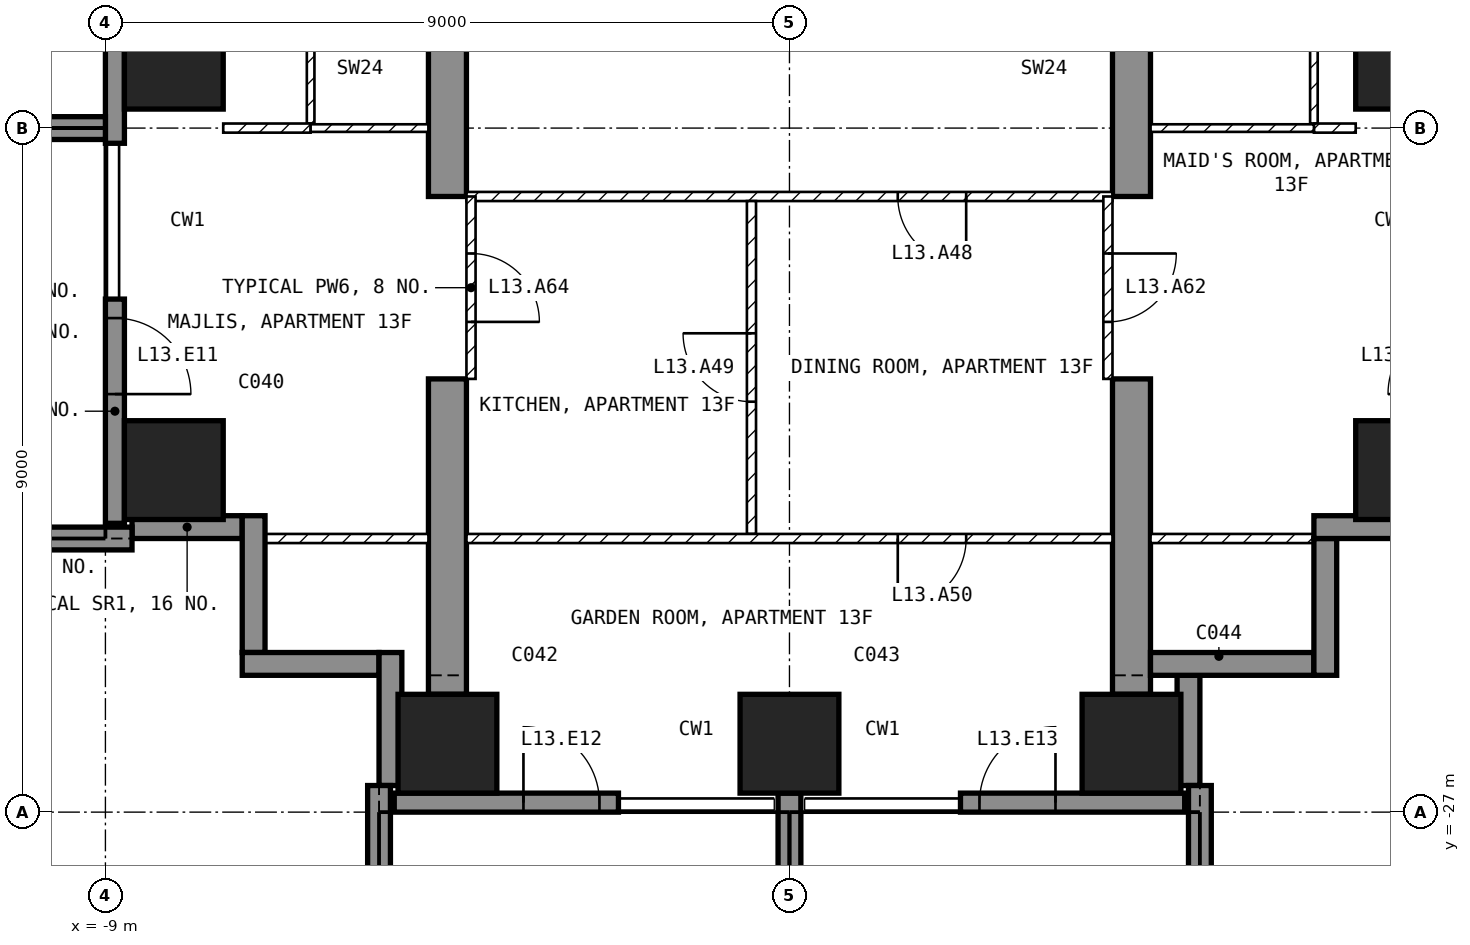
"""IFC4 building model, lengths in metres.
Left out: names, types, materials, properties, quantities, classifications, styles, units other than length and angle.
Written with IfcOpenShell. Run it as: python <this file> out.ifc"""

import sys

from ifc_helpers import new_model, si_unit, direction, frame, frame_2d, origin, origin_2d, place, context, subcontext, project, spatial, polyline, rectangle, outline, extrude, element, fill, save


model = new_model("IFC4")
c1 = context("Model", 3, precision=1e-05, world=origin(), true_north=direction((0.0, 1.0)))
c2 = subcontext(c1, "Body", "Model", "MODEL_VIEW")
j1 = project(units=[si_unit("LENGTHUNIT", "METRE"), si_unit("PLANEANGLEUNIT", "RADIAN")], contexts=[c1])
p1 = place(None, origin())
s1 = spatial("IfcSite", under=j1, at=p1, CompositionType="ELEMENT")
p2 = place(p1, origin())
s2 = spatial("IfcBuilding", under=s1, at=p2, CompositionType="ELEMENT")
p3 = place(p2, frame((0.0, 0.0, 64.5)))
s3 = spatial("IfcBuildingStorey", under=s2, at=p3, CompositionType="ELEMENT", Elevation=64.5)
for number, where, z_axis, x_axis in (
    (1, (-8.1, -22.5, -0.25), (0.0, 0.0, 1.0), (1.0, 0.0, 0.0)),
    (2, (-8.1, -17.1, -0.25), (0.0, 0.0, 1.0), (1.0, 0.0, 0.0)),
    (3, (-4.5, -26.1, -0.25), (0.0, 0.0, 1.0), (1.0, 0.0, 0.0)),
    (4, (0.0, -26.1, -0.25), (0.0, 0.0, 1.0), (1.0, 0.0, 0.0)),
    (5, (4.5, -26.1, -0.25), (0.0, 0.0, 1.0), (1.0, 0.0, 0.0)),
    (6, (8.1, -22.5, -0.25), (0.0, 0.0, 1.0), (1.0, 0.0, 0.0)),
    (7, (8.1, -17.1, -0.25), (0.0, 0.0, 1.0), (1.0, 0.0, 0.0)),
):
    element("IfcColumn", number, at=place(p3, frame(where, z_axis=z_axis, x_axis=x_axis)), inside=s3, PredefinedType="COLUMN", context=c2, shape_type="SweptSolid", body=[
        extrude(rectangle(XDim=1.3, YDim=1.3, at=origin_2d()), origin(), (0.0, 0.0, 1.0), 3.5),
    ])
for number, where, z_axis, x_axis in (
    (8, (-4.75, -25.45, -0.25), (1.0, 0.0, 0.0), (0.0, 1.0, 0.0)),
    (9, (4.25, -25.45, -0.25), (1.0, 0.0, 0.0), (0.0, 1.0, 0.0)),
):
    element("IfcWall", number, at=place(p3, frame(where, z_axis=z_axis, x_axis=x_axis)), inside=s3, PredefinedType="SHEAR", context=c2, shape_type="SweptSolid", body=[
        extrude(outline(polyline([(0.0, 0.0), (4.15, 0.0), (4.15, 2.65), (6.55, 2.65), (6.55, 0.0), (11.95, 0.0), (11.95, 2.65), (14.35, 2.65), (14.35, 0.0), (16.45, 0.0), (16.45, 3.5), (0.0, 3.5), (0.0, 0.0)])), origin(), (0.0, 0.0, 1.0), 0.5),
    ])
p4 = place(p3, frame((-8.875, -14.65, 0.0), z_axis=(0.0, 0.0, 1.0), x_axis=(0.0, -1.0, 0.0)))
e10 = element("IfcWall", 10, at=p4, inside=s3, PredefinedType="SOLIDWALL", context=c2, shape_type="SweptSolid", body=[
    extrude(rectangle(XDim=3.55, YDim=0.25, at=frame_2d((1.775, 0.0))), origin(), (0.0, 0.0, 1.0), 3.25),
])
p5 = place(p4, frame((0.25, 0.0, 0.0)))
e11 = element("IfcOpeningElement", 11, at=p5, cuts=e10, PredefinedType="OPENING", context=c2, shape_type="SweptSolid", body=[
    extrude(rectangle(XDim=1.2, YDim=2.4, at=frame_2d((0.6, 1.2))), frame((0.0, 0.135, 0.0), z_axis=(0.0, -1.0, 0.0), x_axis=(1.0, 0.0, 0.0)), (0.0, 0.0, 1.0), 0.27),
])
p6 = place(p3, frame((-8.875, -20.25, 0.0), z_axis=(0.0, 0.0, 1.0), x_axis=(0.0, -1.0, 0.0)))
e12 = element("IfcWall", 12, at=p6, inside=s3, PredefinedType="SOLIDWALL", context=c2, shape_type="SweptSolid", body=[
    extrude(rectangle(XDim=2.95, YDim=0.25, at=frame_2d((1.475, 0.0))), origin(), (0.0, 0.0, 1.0), 3.25),
])
p7 = place(p6, frame((0.25, 0.0, 0.0)))
e13 = element("IfcOpeningElement", 13, at=p7, cuts=e12, PredefinedType="OPENING", context=c2, shape_type="SweptSolid", body=[
    extrude(rectangle(XDim=1.0, YDim=2.4, at=frame_2d((0.5, 1.2))), frame((0.0, 0.135, 0.0), z_axis=(0.0, -1.0, 0.0), x_axis=(1.0, 0.0, 0.0)), (0.0, 0.0, 1.0), 0.27),
])
p8 = place(p3, frame((-5.2, -26.875, 0.0), z_axis=(0.0, 0.0, 1.0), x_axis=(1.0, 0.0, 0.0)))
e14 = element("IfcWall", 14, at=p8, inside=s3, PredefinedType="SOLIDWALL", context=c2, shape_type="SweptSolid", body=[
    extrude(rectangle(XDim=2.95, YDim=0.25, at=frame_2d((1.475, 0.0))), origin(), (0.0, 0.0, 1.0), 3.25),
])
p9 = place(p8, frame((1.7, 0.0, 0.0)))
e15 = element("IfcOpeningElement", 15, at=p9, cuts=e14, PredefinedType="OPENING", context=c2, shape_type="SweptSolid", body=[
    extrude(rectangle(XDim=1.0, YDim=2.4, at=frame_2d((0.5, 1.2))), frame((0.0, 0.135, 0.0), z_axis=(0.0, -1.0, 0.0), x_axis=(1.0, 0.0, 0.0)), (0.0, 0.0, 1.0), 0.27),
])
p10 = place(p3, frame((2.25, -26.875, 0.0), z_axis=(0.0, 0.0, 1.0), x_axis=(1.0, 0.0, 0.0)))
e16 = element("IfcWall", 16, at=p10, inside=s3, PredefinedType="SOLIDWALL", context=c2, shape_type="SweptSolid", body=[
    extrude(rectangle(XDim=2.95, YDim=0.25, at=frame_2d((1.475, 0.0))), origin(), (0.0, 0.0, 1.0), 3.25),
])
p11 = place(p10, frame((0.25, 0.0, 0.0)))
e17 = element("IfcOpeningElement", 17, at=p11, cuts=e16, PredefinedType="OPENING", context=c2, shape_type="SweptSolid", body=[
    extrude(rectangle(XDim=1.0, YDim=2.4, at=frame_2d((0.5, 1.2))), frame((0.0, 0.135, 0.0), z_axis=(0.0, -1.0, 0.0), x_axis=(1.0, 0.0, 0.0)), (0.0, 0.0, 1.0), 0.27),
])
p12 = place(p3, frame((5.25, -26.65, 0.0), z_axis=(0.0, 0.0, 1.0), x_axis=(0.0, 1.0, 0.0)))
e18 = element("IfcWall", 18, at=p12, inside=s3, PredefinedType="SOLIDWALL", context=c2, shape_type="SweptSolid", body=[
    extrude(rectangle(XDim=1.45, YDim=0.3, at=frame_2d((0.725, 0.0))), origin(), (0.0, 0.0, 1.0), 3.25),
])
p13 = place(p3, frame((4.75, -25.05, 0.0), z_axis=(0.0, 0.0, 1.0), x_axis=(1.0, 0.0, 0.0)))
e19 = element("IfcWall", 19, at=p13, inside=s3, PredefinedType="SOLIDWALL", context=c2, shape_type="SweptSolid", body=[
    extrude(rectangle(XDim=2.15, YDim=0.3, at=frame_2d((1.075, 0.0))), origin(), (0.0, 0.0, 1.0), 3.25),
])
p14 = place(p3, frame((7.05, -25.2, 0.0), z_axis=(0.0, 0.0, 1.0), x_axis=(0.0, 1.0, 0.0)))
e20 = element("IfcWall", 20, at=p14, inside=s3, PredefinedType="SOLIDWALL", context=c2, shape_type="SweptSolid", body=[
    extrude(rectangle(XDim=1.8, YDim=0.3, at=frame_2d((0.9, 0.0))), origin(), (0.0, 0.0, 1.0), 3.25),
])
p15 = place(p3, frame((6.9, -23.25, 0.0), z_axis=(0.0, 0.0, 1.0), x_axis=(1.0, 0.0, 0.0)))
e21 = element("IfcWall", 21, at=p15, inside=s3, PredefinedType="SOLIDWALL", context=c2, shape_type="SweptSolid", body=[
    extrude(rectangle(XDim=1.75, YDim=0.3, at=frame_2d((0.875, 0.0))), origin(), (0.0, 0.0, 1.0), 3.25),
])
p16 = place(p3, frame((-8.65, -23.25, 0.0), z_axis=(0.0, 0.0, 1.0), x_axis=(1.0, 0.0, 0.0)))
e22 = element("IfcWall", 22, at=p16, inside=s3, PredefinedType="SOLIDWALL", context=c2, shape_type="SweptSolid", body=[
    extrude(rectangle(XDim=1.45, YDim=0.3, at=frame_2d((0.725, 0.0))), origin(), (0.0, 0.0, 1.0), 3.25),
])
p17 = place(p3, frame((-7.05, -23.1, 0.0), z_axis=(0.0, 0.0, 1.0), x_axis=(0.0, -1.0, 0.0)))
e23 = element("IfcWall", 23, at=p17, inside=s3, PredefinedType="SOLIDWALL", context=c2, shape_type="SweptSolid", body=[
    extrude(rectangle(XDim=1.8, YDim=0.3, at=frame_2d((0.9, 0.0))), origin(), (0.0, 0.0, 1.0), 3.25),
])
p18 = place(p3, frame((-7.2, -25.05, 0.0), z_axis=(0.0, 0.0, 1.0), x_axis=(1.0, 0.0, 0.0)))
e24 = element("IfcWall", 24, at=p18, inside=s3, PredefinedType="SOLIDWALL", context=c2, shape_type="SweptSolid", body=[
    extrude(rectangle(XDim=1.8, YDim=0.3, at=frame_2d((0.9, 0.0))), origin(), (0.0, 0.0, 1.0), 3.25),
])
p19 = place(p3, frame((-5.25, -24.9, 0.0), z_axis=(0.0, 0.0, 1.0), x_axis=(0.0, -1.0, 0.0)))
e25 = element("IfcWall", 25, at=p19, inside=s3, PredefinedType="SOLIDWALL", context=c2, shape_type="SweptSolid", body=[
    extrude(rectangle(XDim=1.75, YDim=0.3, at=frame_2d((0.875, 0.0))), origin(), (0.0, 0.0, 1.0), 3.25),
])
p20 = place(p3, frame((-8.65, -23.4, 0.0), z_axis=(0.0, 0.0, 1.0), x_axis=(-1.0, 0.0, 0.0)))
e26 = element("IfcWall", 26, at=p20, inside=s3, PredefinedType="SOLIDWALL", context=c2, shape_type="SweptSolid", body=[
    extrude(rectangle(XDim=3.05, YDim=0.3, at=frame_2d((1.525, 0.0))), origin(), (0.0, 0.0, 1.0), 3.25),
])
p21 = place(p3, frame((-9.0, -18.0, 0.0), z_axis=(0.0, 0.0, 1.0), x_axis=(-1.0, 0.0, 0.0)))
e27 = element("IfcWall", 27, at=p21, inside=s3, PredefinedType="SOLIDWALL", context=c2, shape_type="SweptSolid", body=[
    extrude(rectangle(XDim=2.7, YDim=0.3, at=frame_2d((1.35, 0.0))), origin(), (0.0, 0.0, 1.0), 3.25),
])
p22 = place(p3, frame((-5.4, -26.65, 0.0), z_axis=(0.0, 0.0, 1.0), x_axis=(0.0, -1.0, 0.0)))
e28 = element("IfcWall", 28, at=p22, inside=s3, PredefinedType="SOLIDWALL", context=c2, shape_type="SweptSolid", body=[
    extrude(rectangle(XDim=3.05, YDim=0.3, at=frame_2d((1.525, 0.0))), origin(), (0.0, 0.0, 1.0), 3.25),
])
p23 = place(p3, frame((0.0, -26.75, 0.0), z_axis=(0.0, 0.0, 1.0), x_axis=(0.0, -1.0, 0.0)))
e29 = element("IfcWall", 29, at=p23, inside=s3, PredefinedType="SOLIDWALL", context=c2, shape_type="SweptSolid", body=[
    extrude(rectangle(XDim=2.95, YDim=0.3, at=frame_2d((1.475, 0.0))), origin(), (0.0, 0.0, 1.0), 3.25),
])
p24 = place(p3, frame((5.4, -26.65, 0.0), z_axis=(0.0, 0.0, 1.0), x_axis=(0.0, -1.0, 0.0)))
e30 = element("IfcWall", 30, at=p24, inside=s3, PredefinedType="SOLIDWALL", context=c2, shape_type="SweptSolid", body=[
    extrude(rectangle(XDim=3.05, YDim=0.3, at=frame_2d((1.525, 0.0))), origin(), (0.0, 0.0, 1.0), 3.25),
])
p25 = place(p3, frame((4.25, -18.9, 0.0), z_axis=(0.0, 0.0, 1.0), x_axis=(-1.0, 0.0, 0.0)))
e31 = element("IfcWall", 31, at=p25, inside=s3, PredefinedType="PARTITIONING", context=c2, shape_type="SweptSolid", body=[
    extrude(rectangle(XDim=8.5, YDim=0.12, at=frame_2d((4.25, 0.0))), origin(), (0.0, 0.0, 1.0), 3.25),
])
p26 = place(p25, frame((1.925, 0.0, 0.0)))
e32 = element("IfcOpeningElement", 32, at=p26, cuts=e31, PredefinedType="OPENING", context=c2, shape_type="SweptSolid", body=[
    extrude(rectangle(XDim=0.9, YDim=2.1, at=frame_2d((0.45, 1.05))), frame((0.0, 0.07, 0.0), z_axis=(0.0, -1.0, 0.0), x_axis=(1.0, 0.0, 0.0)), (0.0, 0.0, 1.0), 0.14),
])
p27 = place(p3, frame((-0.5, -23.34, 0.0), z_axis=(0.0, 0.0, 1.0), x_axis=(0.0, 1.0, 0.0)))
e33 = element("IfcWall", 33, at=p27, inside=s3, PredefinedType="PARTITIONING", context=c2, shape_type="SweptSolid", body=[
    extrude(rectangle(XDim=4.38, YDim=0.12, at=frame_2d((2.19, 0.0))), origin(), (0.0, 0.0, 1.0), 3.25),
])
p28 = place(p27, frame((1.74, 0.0, 0.0)))
e34 = element("IfcOpeningElement", 34, at=p28, cuts=e33, PredefinedType="OPENING", context=c2, shape_type="SweptSolid", body=[
    extrude(rectangle(XDim=0.9, YDim=2.1, at=frame_2d((0.45, 1.05))), frame((0.0, 0.07, 0.0), z_axis=(0.0, -1.0, 0.0), x_axis=(1.0, 0.0, 0.0)), (0.0, 0.0, 1.0), 0.14),
])
p29 = place(p3, frame((4.25, -23.4, 0.0), z_axis=(0.0, 0.0, 1.0), x_axis=(-1.0, 0.0, 0.0)))
e35 = element("IfcWall", 35, at=p29, inside=s3, PredefinedType="PARTITIONING", context=c2, shape_type="SweptSolid", body=[
    extrude(rectangle(XDim=8.5, YDim=0.12, at=frame_2d((4.25, 0.0))), origin(), (0.0, 0.0, 1.0), 3.25),
])
p30 = place(p29, frame((1.925, 0.0, 0.0)))
e36 = element("IfcOpeningElement", 36, at=p30, cuts=e35, PredefinedType="OPENING", context=c2, shape_type="SweptSolid", body=[
    extrude(rectangle(XDim=0.9, YDim=2.1, at=frame_2d((0.45, 1.05))), frame((0.0, 0.07, 0.0), z_axis=(0.0, -1.0, 0.0), x_axis=(1.0, 0.0, 0.0)), (0.0, 0.0, 1.0), 0.14),
])
p31 = place(p3, frame((6.9, -17.94, 0.0), z_axis=(0.0, 0.0, 1.0), x_axis=(0.0, 1.0, 0.0)))
e37 = element("IfcWall", 37, at=p31, inside=s3, PredefinedType="PARTITIONING", context=c2, shape_type="SweptSolid", body=[
    extrude(rectangle(XDim=3.49, YDim=0.1, at=frame_2d((1.745, 0.0))), origin(), (0.0, 0.0, 1.0), 3.25),
])
p32 = place(p3, frame((7.45, -18.0, 0.0), z_axis=(0.0, 0.0, 1.0), x_axis=(-1.0, 0.0, 0.0)))
e38 = element("IfcWall", 38, at=p32, inside=s3, PredefinedType="PARTITIONING", context=c2, shape_type="SweptSolid", body=[
    extrude(rectangle(XDim=0.55, YDim=0.12, at=frame_2d((0.275, 0.0))), origin(), (0.0, 0.0, 1.0), 3.25),
])
p33 = place(p3, frame((6.9, -18.0, 0.0), z_axis=(0.0, 0.0, 1.0), x_axis=(-1.0, 0.0, 0.0)))
e39 = element("IfcWall", 39, at=p33, inside=s3, PredefinedType="PARTITIONING", context=c2, shape_type="SweptSolid", body=[
    extrude(rectangle(XDim=2.15, YDim=0.1, at=frame_2d((1.075, 0.0))), origin(), (0.0, 0.0, 1.0), 3.25),
])
p34 = place(p3, frame((7.12, -23.4, 0.0), z_axis=(0.0, 0.0, 1.0), x_axis=(-1.0, 0.0, 0.0)))
e40 = element("IfcWall", 40, at=p34, inside=s3, PredefinedType="PARTITIONING", context=c2, shape_type="SweptSolid", body=[
    extrude(rectangle(XDim=2.37, YDim=0.12, at=frame_2d((1.185, 0.0))), origin(), (0.0, 0.0, 1.0), 3.25),
])
p35 = place(p3, frame((-6.3, -14.45, 0.0), z_axis=(0.0, 0.0, 1.0), x_axis=(0.0, -1.0, 0.0)))
e41 = element("IfcWall", 41, at=p35, inside=s3, PredefinedType="PARTITIONING", context=c2, shape_type="SweptSolid", body=[
    extrude(rectangle(XDim=3.49, YDim=0.1, at=frame_2d((1.745, 0.0))), origin(), (0.0, 0.0, 1.0), 3.25),
])
p36 = place(p3, frame((-6.3, -18.0, 0.0), z_axis=(0.0, 0.0, 1.0), x_axis=(-1.0, 0.0, 0.0)))
e42 = element("IfcWall", 42, at=p36, inside=s3, PredefinedType="PARTITIONING", context=c2, shape_type="SweptSolid", body=[
    extrude(rectangle(XDim=1.15, YDim=0.12, at=frame_2d((0.575, 0.0))), origin(), (0.0, 0.0, 1.0), 3.25),
])
p37 = place(p3, frame((-4.75, -18.0, 0.0), z_axis=(0.0, 0.0, 1.0), x_axis=(-1.0, 0.0, 0.0)))
e43 = element("IfcWall", 43, at=p37, inside=s3, PredefinedType="PARTITIONING", context=c2, shape_type="SweptSolid", body=[
    extrude(rectangle(XDim=1.55, YDim=0.1, at=frame_2d((0.775, 0.0))), origin(), (0.0, 0.0, 1.0), 3.25),
])
p38 = place(p3, frame((-4.75, -23.4, 0.0), z_axis=(0.0, 0.0, 1.0), x_axis=(-1.0, 0.0, 0.0)))
e44 = element("IfcWall", 44, at=p38, inside=s3, PredefinedType="PARTITIONING", context=c2, shape_type="SweptSolid", body=[
    extrude(rectangle(XDim=2.37, YDim=0.12, at=frame_2d((1.185, 0.0))), origin(), (0.0, 0.0, 1.0), 3.25),
])
p39 = place(p3, frame((4.19, -18.9, 0.0), z_axis=(0.0, 0.0, 1.0), x_axis=(0.0, -1.0, 0.0)))
e45 = element("IfcWall", 45, at=p39, inside=s3, PredefinedType="PARTITIONING", context=c2, shape_type="SweptSolid", body=[
    extrude(rectangle(XDim=2.4, YDim=0.12, at=frame_2d((1.2, 0.0))), origin(), (0.0, 0.0, 1.0), 2.4),
])
p40 = place(p39, frame((0.75, 0.0, 0.0)))
e46 = element("IfcOpeningElement", 46, at=p40, cuts=e45, PredefinedType="OPENING", context=c2, shape_type="SweptSolid", body=[
    extrude(rectangle(XDim=0.9, YDim=2.1, at=frame_2d((0.45, 1.05))), frame((0.0, 0.07, 0.0), z_axis=(0.0, -1.0, 0.0), x_axis=(1.0, 0.0, 0.0)), (0.0, 0.0, 1.0), 0.14),
])
p41 = place(p3, frame((-4.19, -18.9, 0.0), z_axis=(0.0, 0.0, 1.0), x_axis=(0.0, -1.0, 0.0)))
e47 = element("IfcWall", 47, at=p41, inside=s3, PredefinedType="PARTITIONING", context=c2, shape_type="SweptSolid", body=[
    extrude(rectangle(XDim=2.4, YDim=0.12, at=frame_2d((1.2, 0.0))), origin(), (0.0, 0.0, 1.0), 2.4),
])
p42 = place(p41, frame((0.75, 0.0, 0.0)))
e48 = element("IfcOpeningElement", 48, at=p42, cuts=e47, PredefinedType="OPENING", context=c2, shape_type="SweptSolid", body=[
    extrude(rectangle(XDim=0.9, YDim=2.1, at=frame_2d((0.45, 1.05))), frame((0.0, 0.07, 0.0), z_axis=(0.0, -1.0, 0.0), x_axis=(1.0, 0.0, 0.0)), (0.0, 0.0, 1.0), 0.14),
])
p43 = place(p7, origin())
e49 = element("IfcDoor", 49, at=p43, inside=s3, OperationType="SINGLE_SWING_RIGHT", PredefinedType="DOOR", context=c2, shape_type="SweptSolid", body=[
    extrude(rectangle(XDim=1.0, YDim=2.4, at=frame_2d((0.5, 1.2))), frame((0.0, 0.025, 0.0), z_axis=(0.0, -1.0, 0.0), x_axis=(1.0, 0.0, 0.0)), (0.0, 0.0, 1.0), 0.05),
])
fill(e13, e49)
p44 = place(p9, origin())
e50 = element("IfcDoor", 50, at=p44, inside=s3, OperationType="SINGLE_SWING_LEFT", PredefinedType="DOOR", context=c2, shape_type="SweptSolid", body=[
    extrude(rectangle(XDim=1.0, YDim=2.4, at=frame_2d((0.5, 1.2))), frame((0.0, 0.025, 0.0), z_axis=(0.0, -1.0, 0.0), x_axis=(1.0, 0.0, 0.0)), (0.0, 0.0, 1.0), 0.05),
])
fill(e15, e50)
p45 = place(p11, origin())
e51 = element("IfcDoor", 51, at=p45, inside=s3, OperationType="SINGLE_SWING_RIGHT", PredefinedType="DOOR", context=c2, shape_type="SweptSolid", body=[
    extrude(rectangle(XDim=1.0, YDim=2.4, at=frame_2d((0.5, 1.2))), frame((0.0, 0.025, 0.0), z_axis=(0.0, -1.0, 0.0), x_axis=(1.0, 0.0, 0.0)), (0.0, 0.0, 1.0), 0.05),
])
fill(e17, e51)
p46 = place(p26, origin())
e52 = element("IfcDoor", 52, at=p46, inside=s3, OperationType="SINGLE_SWING_LEFT", PredefinedType="DOOR", context=c2, shape_type="SweptSolid", body=[
    extrude(rectangle(XDim=0.9, YDim=2.1, at=frame_2d((0.45, 1.05))), frame((0.0, 0.025, 0.0), z_axis=(0.0, -1.0, 0.0), x_axis=(1.0, 0.0, 0.0)), (0.0, 0.0, 1.0), 0.05),
])
fill(e32, e52)
p47 = place(p28, origin())
e53 = element("IfcDoor", 53, at=p47, inside=s3, OperationType="SINGLE_SWING_RIGHT", PredefinedType="DOOR", context=c2, shape_type="SweptSolid", body=[
    extrude(rectangle(XDim=0.9, YDim=2.1, at=frame_2d((0.45, 1.05))), frame((0.0, 0.025, 0.0), z_axis=(0.0, -1.0, 0.0), x_axis=(1.0, 0.0, 0.0)), (0.0, 0.0, 1.0), 0.05),
])
fill(e34, e53)
p48 = place(p30, origin())
e54 = element("IfcDoor", 54, at=p48, inside=s3, OperationType="SINGLE_SWING_RIGHT", PredefinedType="DOOR", context=c2, shape_type="SweptSolid", body=[
    extrude(rectangle(XDim=0.9, YDim=2.1, at=frame_2d((0.45, 1.05))), frame((0.0, 0.025, 0.0), z_axis=(0.0, -1.0, 0.0), x_axis=(1.0, 0.0, 0.0)), (0.0, 0.0, 1.0), 0.05),
])
fill(e36, e54)
p49 = place(p40, origin())
e55 = element("IfcDoor", 55, at=p49, inside=s3, OperationType="SINGLE_SWING_LEFT", PredefinedType="DOOR", context=c2, shape_type="SweptSolid", body=[
    extrude(rectangle(XDim=0.9, YDim=2.1, at=frame_2d((0.45, 1.05))), frame((0.0, 0.025, 0.0), z_axis=(0.0, -1.0, 0.0), x_axis=(1.0, 0.0, 0.0)), (0.0, 0.0, 1.0), 0.05),
])
fill(e46, e55)
p50 = place(p42, origin())
e56 = element("IfcDoor", 56, at=p50, inside=s3, OperationType="SINGLE_SWING_RIGHT", PredefinedType="DOOR", context=c2, shape_type="SweptSolid", body=[
    extrude(rectangle(XDim=0.9, YDim=2.1, at=frame_2d((0.45, 1.05))), frame((0.0, 0.025, 0.0), z_axis=(0.0, -1.0, 0.0), x_axis=(1.0, 0.0, 0.0)), (0.0, 0.0, 1.0), 0.05),
])
fill(e48, e56)
save(model, sys.argv[1])
